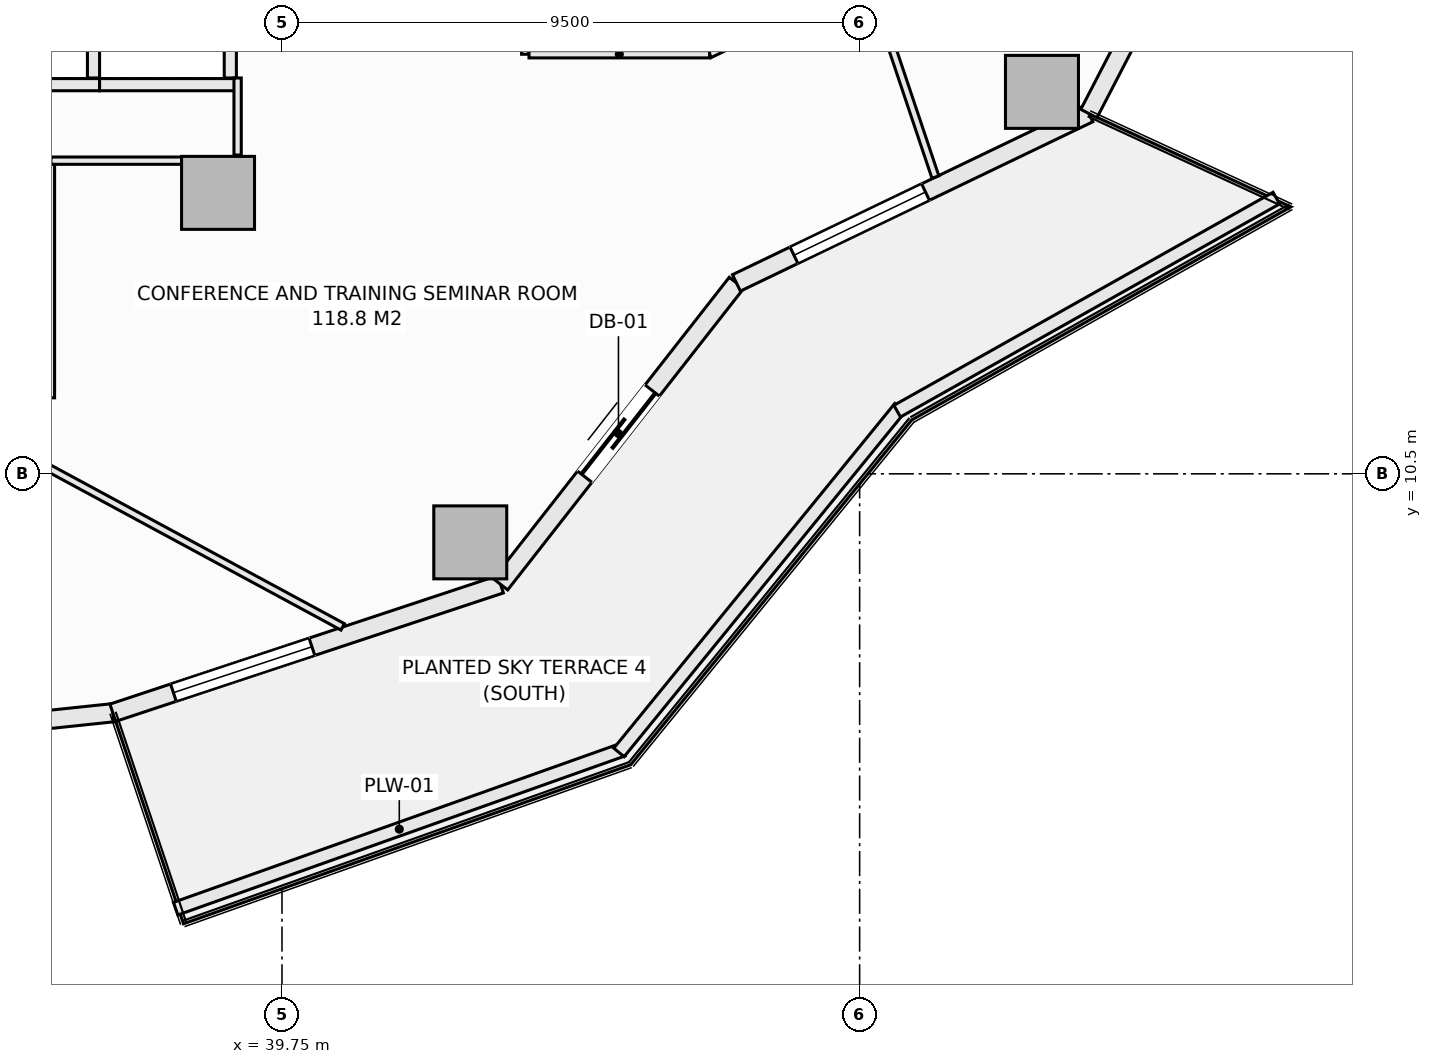
"""IFC4 building model, lengths in metres.
Left out: names, types, materials, properties, quantities, classifications, styles, units other than length and angle.
Written with IfcOpenShell. Run it as: python <this file> out.ifc"""

import sys

from ifc_helpers import new_model, si_unit, direction, frame, frame_2d, origin, origin_2d, place, context, subcontext, project, spatial, rectangle, extrude, element, fill, save


model = new_model("IFC4")
c1 = context("Model", 3, precision=1e-05, world=origin(), true_north=direction((0.0, 1.0)))
c2 = subcontext(c1, "Body", "Model", "MODEL_VIEW")
j1 = project(units=[si_unit("LENGTHUNIT", "METRE"), si_unit("PLANEANGLEUNIT", "RADIAN")], contexts=[c1])
p1 = place(None, origin())
s1 = spatial("IfcSite", under=j1, at=p1, CompositionType="ELEMENT")
p2 = place(p1, origin())
s2 = spatial("IfcBuilding", under=s1, at=p2, CompositionType="ELEMENT")
p3 = place(p2, frame((0.0, 0.0, 91.95)))
s3 = spatial("IfcBuildingStorey", under=s2, at=p3, CompositionType="ELEMENT", Elevation=91.95)
for number, where, z_axis, x_axis in (
    (1, (42.846, 9.373, -0.28), (0.0, 0.0, 1.0), (1.0, 0.0, 0.0)),
    (2, (52.249, 16.781, -0.28), (0.0, 0.0, 1.0), (1.0, 0.0, 0.0)),
    (3, (38.698, 15.121, -0.28), (0.0, 0.0, 1.0), (1.0, 0.0, 0.0)),
):
    element("IfcColumn", number, at=place(p3, frame(where, z_axis=z_axis, x_axis=x_axis)), inside=s3, PredefinedType="COLUMN", context=c2, shape_type="SweptSolid", body=[
        extrude(rectangle(XDim=1.2, YDim=1.2, at=origin_2d()), origin(), (0.0, 0.0, 1.0), 3.81),
    ])
p4 = place(p3, frame((30.125, 5.85, 0.0), z_axis=(0.0, 0.0, 1.0), x_axis=(0.994498840295, 0.104747585419, 0.0)))
e4 = element("IfcWall", 4, at=p4, inside=s3, PredefinedType="SOLIDWALL", context=c2, shape_type="SweptSolid", body=[
    extrude(rectangle(XDim=6.88, YDim=0.3, at=frame_2d((3.44, 0.0))), origin(), (0.0, 0.0, 1.0), 3.053),
])
p5 = place(p4, frame((2.24, 0.0, 0.85)))
e5 = element("IfcOpeningElement", 5, at=p5, cuts=e4, PredefinedType="OPENING", context=c2, shape_type="SweptSolid", body=[
    extrude(rectangle(XDim=2.4, YDim=1.9, at=frame_2d((1.2, 0.95))), frame((0.0, 0.16, 0.0), z_axis=(0.0, -1.0, 0.0), x_axis=(1.0, 0.0, 0.0)), (0.0, 0.0, 1.0), 0.32),
])
p6 = place(p3, frame((36.968, 6.571, 0.0), z_axis=(0.0, 0.0, 1.0), x_axis=(0.949245153629, 0.314537181127, 0.0)))
e6 = element("IfcWall", 6, at=p6, inside=s3, PredefinedType="SOLIDWALL", context=c2, shape_type="SweptSolid", body=[
    extrude(rectangle(XDim=6.717, YDim=0.3, at=frame_2d((3.358, 0.0))), origin(), (0.0, 0.0, 1.0), 3.053),
])
p7 = place(p6, frame((1.05, 0.0, 0.85)))
e7 = element("IfcOpeningElement", 7, at=p7, cuts=e6, PredefinedType="OPENING", context=c2, shape_type="SweptSolid", body=[
    extrude(rectangle(XDim=2.4, YDim=1.9, at=frame_2d((1.2, 0.95))), frame((0.0, 0.16, 0.0), z_axis=(0.0, -1.0, 0.0), x_axis=(1.0, 0.0, 0.0)), (0.0, 0.0, 1.0), 0.32),
])
p8 = place(p3, frame((43.344, 8.684, 0.0), z_axis=(0.0, 0.0, 1.0), x_axis=(0.616434798832, 0.78740595552, 0.0)))
e8 = element("IfcWall", 8, at=p8, inside=s3, PredefinedType="SOLIDWALL", context=c2, shape_type="SweptSolid", body=[
    extrude(rectangle(XDim=6.294, YDim=0.3, at=frame_2d((3.147, 0.0))), origin(), (0.0, 0.0, 1.0), 3.053),
])
p9 = place(p8, frame((2.247, 0.0, 0.0)))
e9 = element("IfcOpeningElement", 9, at=p9, cuts=e8, PredefinedType="OPENING", context=c2, shape_type="SweptSolid", body=[
    extrude(rectangle(XDim=1.8, YDim=2.25, at=frame_2d((0.9, 1.125))), frame((0.0, 0.16, 0.0), z_axis=(0.0, -1.0, 0.0), x_axis=(1.0, 0.0, 0.0)), (0.0, 0.0, 1.0), 0.32),
])
p10 = place(p3, frame((47.224, 13.64, 0.0), z_axis=(0.0, 0.0, 1.0), x_axis=(0.901354747727, 0.433081538224, 0.0)))
e10 = element("IfcWall", 10, at=p10, inside=s3, PredefinedType="SOLIDWALL", context=c2, shape_type="SweptSolid", body=[
    extrude(rectangle(XDim=6.431, YDim=0.3, at=frame_2d((3.215, 0.0))), origin(), (0.0, 0.0, 1.0), 3.053),
])
p11 = place(p10, frame((1.05, 0.0, 0.85)))
e11 = element("IfcOpeningElement", 11, at=p11, cuts=e10, PredefinedType="OPENING", context=c2, shape_type="SweptSolid", body=[
    extrude(rectangle(XDim=2.4, YDim=1.9, at=frame_2d((1.2, 0.95))), frame((0.0, 0.16, 0.0), z_axis=(0.0, -1.0, 0.0), x_axis=(1.0, 0.0, 0.0)), (0.0, 0.0, 1.0), 0.32),
])
p12 = place(p3, frame((53.021, 16.425, 0.0), z_axis=(0.0, 0.0, 1.0), x_axis=(0.459800981414, 0.888021991558, 0.0)))
e12 = element("IfcWall", 12, at=p12, inside=s3, PredefinedType="SOLIDWALL", context=c2, shape_type="SweptSolid", body=[
    extrude(rectangle(XDim=5.744, YDim=0.3, at=frame_2d((2.872, 0.0))), origin(), (0.0, 0.0, 1.0), 3.053),
])
p13 = place(p12, frame((1.672, 0.0, 0.85)))
e13 = element("IfcOpeningElement", 13, at=p13, cuts=e12, PredefinedType="OPENING", context=c2, shape_type="SweptSolid", body=[
    extrude(rectangle(XDim=2.4, YDim=1.9, at=frame_2d((1.2, 0.95))), frame((0.0, 0.16, 0.0), z_axis=(0.0, -1.0, 0.0), x_axis=(1.0, 0.0, 0.0)), (0.0, 0.0, 1.0), 0.32),
])
p14 = place(p3, frame((38.001, 3.349, 0.0), z_axis=(0.0, 0.0, 1.0), x_axis=(0.942203722205, 0.335040513764, 0.0)))
e14 = element("IfcWall", 14, at=p14, inside=s3, PredefinedType="PARAPET", context=c2, shape_type="SweptSolid", body=[
    extrude(rectangle(XDim=7.807, YDim=0.22, at=frame_2d((3.904, 0.0))), origin(), (0.0, 0.0, 1.0), 0.52),
])
p15 = place(p3, frame((45.292, 5.918, 0.0), z_axis=(0.0, 0.0, 1.0), x_axis=(0.631819273026, 0.775115737315, 0.0)))
e15 = element("IfcWall", 15, at=p15, inside=s3, PredefinedType="PARAPET", context=c2, shape_type="SweptSolid", body=[
    extrude(rectangle(XDim=7.316, YDim=0.22, at=frame_2d((3.658, 0.0))), origin(), (0.0, 0.0, 1.0), 0.52),
])
p16 = place(p3, frame((49.868, 11.531, 0.0), z_axis=(0.0, 0.0, 1.0), x_axis=(0.871775109335, 0.489906275468, 0.0)))
e16 = element("IfcWall", 16, at=p16, inside=s3, PredefinedType="PARAPET", context=c2, shape_type="SweptSolid", body=[
    extrude(rectangle(XDim=7.152, YDim=0.22, at=frame_2d((3.576, 0.0))), origin(), (0.0, 0.0, 1.0), 0.52),
])
p17 = place(p3, frame((34.5, 16.9, 0.0), z_axis=(0.0, 0.0, 1.0), x_axis=(1.0, 0.0, 0.0)))
e17 = element("IfcWall", 17, at=p17, inside=s3, PredefinedType="SOLIDWALL", context=c2, shape_type="SweptSolid", body=[
    extrude(rectangle(XDim=2.25, YDim=0.2, at=frame_2d((1.125, 0.0))), origin(), (0.0, 0.0, 1.0), 3.53),
])
p18 = place(p3, frame((36.65, 17.01, 0.0), z_axis=(0.0, 0.0, 1.0), x_axis=(0.0, 1.0, 0.0)))
e18 = element("IfcWall", 18, at=p18, inside=s3, PredefinedType="SOLIDWALL", context=c2, shape_type="SweptSolid", body=[
    extrude(rectangle(XDim=2.43, YDim=0.2, at=frame_2d((1.215, 0.0))), origin(), (0.0, 0.0, 1.0), 3.53),
])
p19 = place(p3, frame((36.75, 16.9, 0.0), z_axis=(0.0, 0.0, 1.0), x_axis=(1.0, 0.0, 0.0)))
e19 = element("IfcWall", 19, at=p19, inside=s3, PredefinedType="SOLIDWALL", context=c2, shape_type="SweptSolid", body=[
    extrude(rectangle(XDim=2.25, YDim=0.2, at=frame_2d((1.125, 0.0))), origin(), (0.0, 0.0, 1.0), 3.53),
])
p20 = place(p3, frame((38.9, 17.01, 0.0), z_axis=(0.0, 0.0, 1.0), x_axis=(0.0, 1.0, 0.0)))
e20 = element("IfcWall", 20, at=p20, inside=s3, PredefinedType="SOLIDWALL", context=c2, shape_type="SweptSolid", body=[
    extrude(rectangle(XDim=2.43, YDim=0.2, at=frame_2d((1.215, 0.0))), origin(), (0.0, 0.0, 1.0), 3.53),
])
p21 = place(p3, frame((35.95, 15.65, 0.0), z_axis=(0.0, 0.0, 1.0), x_axis=(1.0, 0.0, 0.0)))
e21 = element("IfcWall", 21, at=p21, inside=s3, PredefinedType="PARTITIONING", context=c2, shape_type="SweptSolid", body=[
    extrude(rectangle(XDim=2.291, YDim=0.12, at=frame_2d((1.146, 0.0))), origin(), (0.0, 0.0, 1.0), 3.53),
])
p22 = place(p3, frame((35.95, 11.75, 0.0), z_axis=(0.0, 0.0, 1.0), x_axis=(0.0, 1.0, 0.0)))
e22 = element("IfcWall", 22, at=p22, inside=s3, PredefinedType="PARTITIONING", context=c2, shape_type="SweptSolid", body=[
    extrude(rectangle(XDim=3.838, YDim=0.12, at=frame_2d((1.919, 0.0))), origin(), (0.0, 0.0, 1.0), 3.53),
])
p23 = place(p3, frame((43.75, 17.4, 0.0), z_axis=(0.0, 0.0, 1.0), x_axis=(0.0, 1.0, 0.0)))
e23 = element("IfcWall", 23, at=p23, inside=s3, PredefinedType="PARTITIONING", context=c2, shape_type="SweptSolid", body=[
    extrude(rectangle(XDim=5.62, YDim=0.12, at=frame_2d((2.81, 0.0))), origin(), (0.0, 0.0, 1.0), 3.53),
])
p24 = place(p23, frame((2.125, 0.0, 0.0)))
e24 = element("IfcOpeningElement", 24, at=p24, cuts=e23, PredefinedType="OPENING", context=c2, shape_type="SweptSolid", body=[
    extrude(rectangle(XDim=0.95, YDim=2.1, at=frame_2d((0.475, 1.05))), frame((0.0, 0.07, 0.0), z_axis=(0.0, -1.0, 0.0), x_axis=(1.0, 0.0, 0.0)), (0.0, 0.0, 1.0), 0.14),
])
p25 = place(p3, frame((46.783, 17.4, 0.0), z_axis=(0.0, 0.0, 1.0), x_axis=(0.901339159108, 0.433113980679, 0.0)))
e25 = element("IfcWall", 25, at=p25, inside=s3, PredefinedType="PARTITIONING", context=c2, shape_type="SweptSolid", body=[
    extrude(rectangle(XDim=4.29, YDim=0.12, at=frame_2d((2.145, 0.0))), origin(), (0.0, 0.0, 1.0), 3.53),
])
p26 = place(p3, frame((43.812, 17.4, 0.0), z_axis=(0.0, 0.0, 1.0), x_axis=(1.0, 0.0, 0.0)))
e26 = element("IfcWall", 26, at=p26, inside=s3, PredefinedType="PARTITIONING", context=c2, shape_type="SweptSolid", body=[
    extrude(rectangle(XDim=2.971, YDim=0.12, at=frame_2d((1.485, 0.0))), origin(), (0.0, 0.0, 1.0), 3.53),
])
p27 = place(p3, frame((39.02, 15.742, 0.0), z_axis=(0.0, 0.0, 1.0), x_axis=(0.0, 1.0, 0.0)))
e27 = element("IfcWall", 27, at=p27, inside=s3, PredefinedType="PARTITIONING", context=c2, shape_type="SweptSolid", body=[
    extrude(rectangle(XDim=1.268, YDim=0.12, at=frame_2d((0.634, 0.0))), origin(), (0.0, 0.0, 1.0), 2.894),
])
p28 = place(p3, frame((33.889, 11.688, 0.0), z_axis=(0.0, 0.0, 1.0), x_axis=(0.879862970093, -0.475227475909, 0.0)))
e28 = element("IfcWall", 28, at=p28, inside=s3, PredefinedType="PARTITIONING", context=c2, shape_type="SweptSolid", body=[
    extrude(rectangle(XDim=7.795, YDim=0.12, at=frame_2d((3.898, 0.0))), origin(), (0.0, 0.0, 1.0), 3.53),
])
p29 = place(p3, frame((49.417, 18.597, 0.0), z_axis=(0.0, 0.0, 1.0), x_axis=(0.318105552227, -0.948055303051, 0.0)))
e29 = element("IfcWall", 29, at=p29, inside=s3, PredefinedType="PARTITIONING", context=c2, shape_type="SweptSolid", body=[
    extrude(rectangle(XDim=3.392, YDim=0.12, at=frame_2d((1.696, 0.0))), origin(), (0.0, 0.0, 1.0), 3.53),
])
p30 = place(p7, origin())
e30 = element("IfcWindow", 30, at=p30, inside=s3, PartitioningType="SINGLE_PANEL", PredefinedType="WINDOW", context=c2, shape_type="SweptSolid", body=[
    extrude(rectangle(XDim=2.4, YDim=1.9, at=frame_2d((1.2, 0.95))), frame((0.0, 0.03, 0.0), z_axis=(0.0, -1.0, 0.0), x_axis=(1.0, 0.0, 0.0)), (0.0, 0.0, 1.0), 0.06),
])
fill(e7, e30)
p31 = place(p9, frame((1.8, 0.0, 0.0), z_axis=(0.0, 0.0, 1.0), x_axis=(-1.0, 0.0, 0.0)))
e31 = element("IfcDoor", 31, at=p31, inside=s3, OperationType="SLIDING_TO_LEFT", PredefinedType="DOOR", context=c2, shape_type="SweptSolid", body=[
    extrude(rectangle(XDim=1.8, YDim=2.25, at=frame_2d((0.9, 1.125))), frame((0.0, 0.025, 0.0), z_axis=(0.0, -1.0, 0.0), x_axis=(1.0, 0.0, 0.0)), (0.0, 0.0, 1.0), 0.05),
])
fill(e9, e31)
p32 = place(p11, origin())
e32 = element("IfcWindow", 32, at=p32, inside=s3, PartitioningType="SINGLE_PANEL", PredefinedType="WINDOW", context=c2, shape_type="SweptSolid", body=[
    extrude(rectangle(XDim=2.4, YDim=1.9, at=frame_2d((1.2, 0.95))), frame((0.0, 0.03, 0.0), z_axis=(0.0, -1.0, 0.0), x_axis=(1.0, 0.0, 0.0)), (0.0, 0.0, 1.0), 0.06),
])
fill(e11, e32)
save(model, sys.argv[1])
